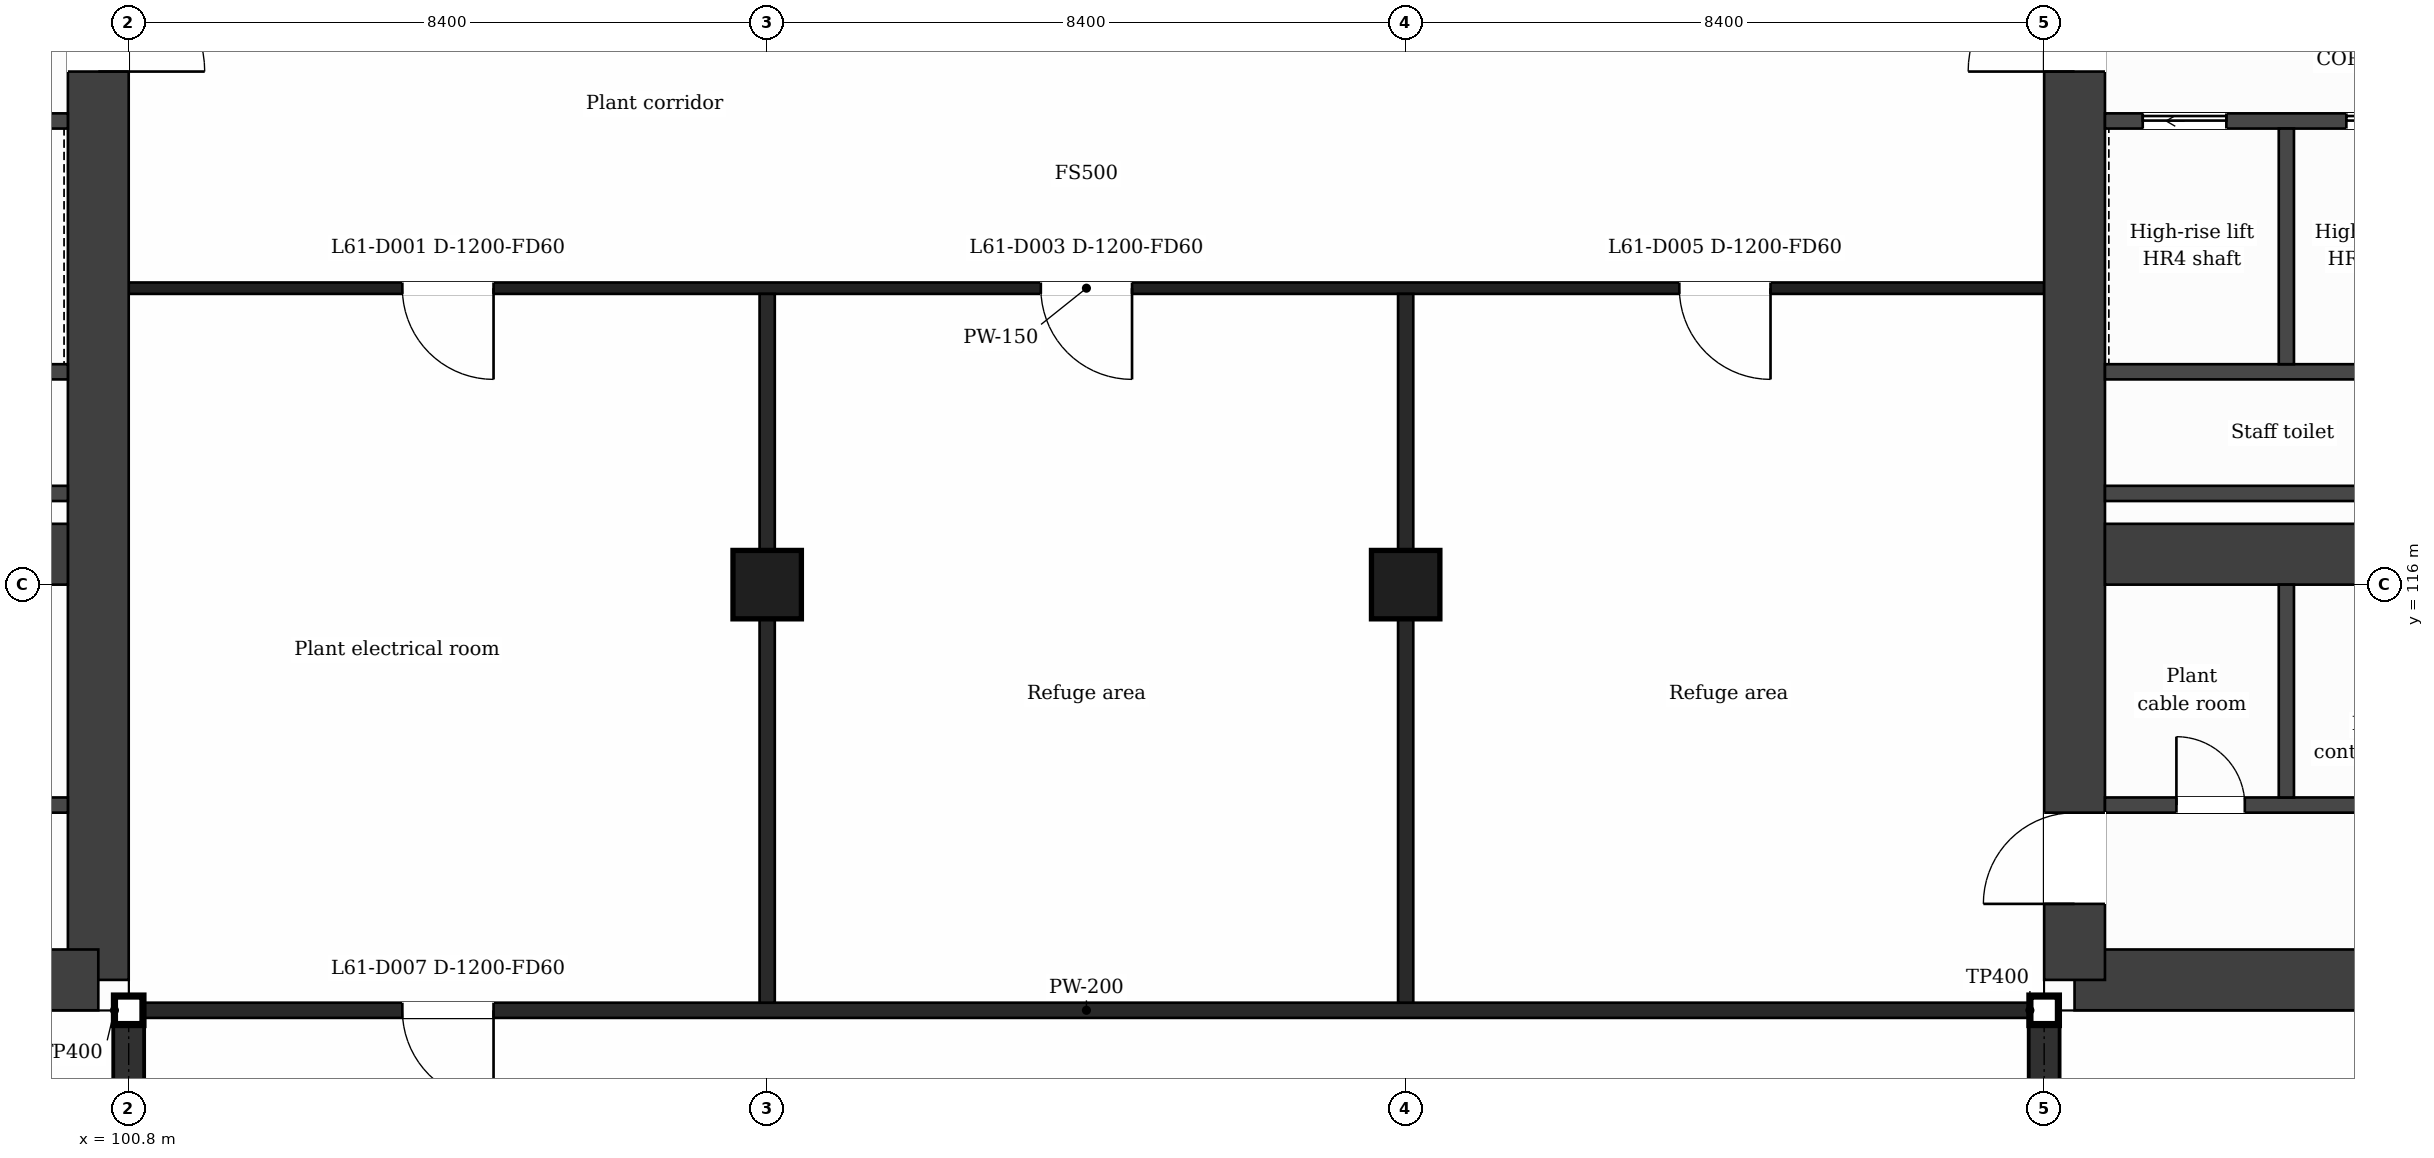
"""IFC4 building model, lengths in metres.
Left out: names, types, materials, properties, quantities, classifications, styles, units other than length and angle.
Written with IfcOpenShell. Run it as: python <this file> out.ifc"""

import sys

from ifc_helpers import new_model, si_unit, direction, frame, frame_2d, origin, origin_2d, place, context, subcontext, project, spatial, rectangle, extrude, element, fill, save


model = new_model("IFC4")
c1 = context("Model", 3, precision=1e-05, world=origin(), true_north=direction((0.0, 1.0)))
c2 = subcontext(c1, "Body", "Model", "MODEL_VIEW")
j1 = project(units=[si_unit("LENGTHUNIT", "METRE"), si_unit("PLANEANGLEUNIT", "RADIAN")], contexts=[c1])
p1 = place(None, origin())
s1 = spatial("IfcSite", under=j1, at=p1, CompositionType="ELEMENT")
p2 = place(p1, origin())
s2 = spatial("IfcBuilding", under=s1, at=p2, CompositionType="ELEMENT")
p3 = place(p2, frame((0.0, 0.0, 254.0)))
s3 = spatial("IfcBuildingStorey", under=s2, at=p3, CompositionType="ELEMENT", Elevation=254.0)
p4 = place(p3, frame((100.4, 132.0, 0.0), z_axis=(0.0, 0.0, 1.0), x_axis=(0.0, -1.0, 0.0)))
e1 = element("IfcWall", 1, at=p4, inside=s3, PredefinedType="SHEAR", context=c2, shape_type="SweptSolid", body=[
    extrude(rectangle(XDim=21.2, YDim=0.8, at=frame_2d((10.6, 0.0))), origin(), (0.0, 0.0, 1.0), 5.0),
])
p5 = place(p4, frame((2.4, 0.0, 0.0)))
e2 = element("IfcOpeningElement", 2, at=p5, cuts=e1, PredefinedType="OPENING", context=c2, shape_type="SweptSolid", body=[
    extrude(rectangle(XDim=1.2, YDim=2.1, at=frame_2d((0.6, 1.05))), frame((0.0, 0.41, 0.0), z_axis=(0.0, -1.0, 0.0), x_axis=(1.0, 0.0, 0.0)), (0.0, 0.0, 1.0), 0.82),
])
p6 = place(p4, frame((7.85, 0.0, 0.0)))
e3 = element("IfcOpeningElement", 3, at=p6, cuts=e1, PredefinedType="OPENING", context=c2, shape_type="SweptSolid", body=[
    extrude(rectangle(XDim=1.4, YDim=2.1, at=frame_2d((0.7, 1.05))), frame((0.0, 0.41, 0.0), z_axis=(0.0, -1.0, 0.0), x_axis=(1.0, 0.0, 0.0)), (0.0, 0.0, 1.0), 0.82),
])
p7 = place(p3, frame((100.4, 110.8, 0.0), z_axis=(0.0, 0.0, 1.0), x_axis=(-1.0, 0.0, 0.0)))
e4 = element("IfcWall", 4, at=p7, inside=s3, PredefinedType="SHEAR", context=c2, shape_type="SweptSolid", body=[
    extrude(rectangle(XDim=14.273, YDim=0.8, at=frame_2d((7.137, 0.0))), origin(), (0.0, 0.0, 1.0), 5.0),
])
p8 = place(p7, frame((5.908, 0.0, 0.0)))
e5 = element("IfcOpeningElement", 5, at=p8, cuts=e4, PredefinedType="OPENING", context=c2, shape_type="SweptSolid", body=[
    extrude(rectangle(XDim=1.4, YDim=2.1, at=frame_2d((0.7, 1.05))), frame((0.0, 0.41, 0.0), z_axis=(0.0, -1.0, 0.0), x_axis=(1.0, 0.0, 0.0)), (0.0, 0.0, 1.0), 0.82),
])
p9 = place(p3, frame((94.7, 116.4, 0.0), z_axis=(0.0, 0.0, 1.0), x_axis=(1.0, 0.0, 0.0)))
e6 = element("IfcWall", 6, at=p9, inside=s3, PredefinedType="SHEAR", context=c2, shape_type="SweptSolid", body=[
    extrude(rectangle(XDim=5.3, YDim=0.8, at=frame_2d((2.65, 0.0))), origin(), (0.0, 0.0, 1.0), 5.0),
])
p10 = place(p3, frame((140.673, 110.8, 0.0), z_axis=(0.0, 0.0, 1.0), x_axis=(-1.0, 0.0, 0.0)))
e7 = element("IfcWall", 7, at=p10, inside=s3, PredefinedType="SHEAR", context=c2, shape_type="SweptSolid", body=[
    extrude(rectangle(XDim=14.273, YDim=0.8, at=frame_2d((7.137, 0.0))), origin(), (0.0, 0.0, 1.0), 5.0),
])
p11 = place(p10, frame((6.965, 0.0, 0.0)))
e8 = element("IfcOpeningElement", 8, at=p11, cuts=e7, PredefinedType="OPENING", context=c2, shape_type="SweptSolid", body=[
    extrude(rectangle(XDim=1.4, YDim=2.1, at=frame_2d((0.7, 1.05))), frame((0.0, 0.41, 0.0), z_axis=(0.0, -1.0, 0.0), x_axis=(1.0, 0.0, 0.0)), (0.0, 0.0, 1.0), 0.82),
])
p12 = place(p3, frame((126.4, 110.8, 0.0), z_axis=(0.0, 0.0, 1.0), x_axis=(0.0, 1.0, 0.0)))
e9 = element("IfcWall", 9, at=p12, inside=s3, PredefinedType="SHEAR", context=c2, shape_type="SweptSolid", body=[
    extrude(rectangle(XDim=21.2, YDim=0.8, at=frame_2d((10.6, 0.0))), origin(), (0.0, 0.0, 1.0), 5.0),
])
p13 = place(p12, frame((1.0, 0.0, 0.0)))
e10 = element("IfcOpeningElement", 10, at=p13, cuts=e9, PredefinedType="OPENING", context=c2, shape_type="SweptSolid", body=[
    extrude(rectangle(XDim=1.2, YDim=2.1, at=frame_2d((0.6, 1.05))), frame((0.0, 0.41, 0.0), z_axis=(0.0, -1.0, 0.0), x_axis=(1.0, 0.0, 0.0)), (0.0, 0.0, 1.0), 0.82),
])
p14 = place(p12, frame((11.95, 0.0, 0.0)))
e11 = element("IfcOpeningElement", 11, at=p14, cuts=e9, PredefinedType="OPENING", context=c2, shape_type="SweptSolid", body=[
    extrude(rectangle(XDim=1.4, YDim=2.1, at=frame_2d((0.7, 1.05))), frame((0.0, 0.41, 0.0), z_axis=(0.0, -1.0, 0.0), x_axis=(1.0, 0.0, 0.0)), (0.0, 0.0, 1.0), 0.82),
])
p15 = place(p3, frame((126.8, 116.4, 0.0), z_axis=(0.0, 0.0, 1.0), x_axis=(1.0, 0.0, 0.0)))
e12 = element("IfcWall", 12, at=p15, inside=s3, PredefinedType="SHEAR", context=c2, shape_type="SweptSolid", body=[
    extrude(rectangle(XDim=5.3, YDim=0.8, at=frame_2d((2.65, 0.0))), origin(), (0.0, 0.0, 1.0), 5.0),
])
for number, where, z_axis, x_axis in (
    (13, (109.2, 116.0, 0.0), (0.0, 0.0, 1.0), (1.0, 0.0, 0.0)),
    (14, (117.6, 116.0, 0.0), (0.0, 0.0, 1.0), (1.0, 0.0, 0.0)),
):
    element("IfcColumn", number, at=place(p3, frame(where, z_axis=z_axis, x_axis=x_axis)), inside=s3, PredefinedType="COLUMN", context=c2, shape_type="SweptSolid", body=[
        extrude(rectangle(XDim=0.9, YDim=0.9, at=origin_2d()), origin(), (0.0, 0.0, 1.0), 5.0),
    ])
p16 = place(p3, frame((100.7, 110.4, 0.0), z_axis=(0.0, 0.0, 1.0), x_axis=(1.0, 0.0, 0.0)))
e15 = element("IfcWall", 15, at=p16, inside=s3, PredefinedType="PARTITIONING", context=c2, shape_type="SweptSolid", body=[
    extrude(rectangle(XDim=25.4, YDim=0.2, at=frame_2d((12.7, 0.0))), origin(), (0.0, 0.0, 1.0), 4.68),
])
p17 = place(p16, frame((3.7, 0.0, 0.0)))
e16 = element("IfcOpeningElement", 16, at=p17, cuts=e15, PredefinedType="OPENING", context=c2, shape_type="SweptSolid", body=[
    extrude(rectangle(XDim=1.2, YDim=2.1, at=frame_2d((0.6, 1.05))), frame((0.0, 0.11, 0.0), z_axis=(0.0, -1.0, 0.0), x_axis=(1.0, 0.0, 0.0)), (0.0, 0.0, 1.0), 0.22),
])
p18 = place(p3, frame((95.127, 113.1, 0.0), z_axis=(0.0, 0.0, 1.0), x_axis=(1.0, 0.0, 0.0)))
e17 = element("IfcWall", 17, at=p18, inside=s3, PredefinedType="PARTITIONING", context=c2, shape_type="SweptSolid", body=[
    extrude(rectangle(XDim=4.873, YDim=0.2, at=frame_2d((2.437, 0.0))), origin(), (0.0, 0.0, 1.0), 4.68),
])
p19 = place(p18, frame((3.151, 0.0, 0.0)))
e18 = element("IfcOpeningElement", 18, at=p19, cuts=e17, PredefinedType="OPENING", context=c2, shape_type="SweptSolid", body=[
    extrude(rectangle(XDim=0.9, YDim=2.1, at=frame_2d((0.45, 1.05))), frame((0.0, 0.11, 0.0), z_axis=(0.0, -1.0, 0.0), x_axis=(1.0, 0.0, 0.0)), (0.0, 0.0, 1.0), 0.22),
])
p20 = place(p3, frame((126.8, 113.1, 0.0), z_axis=(0.0, 0.0, 1.0), x_axis=(1.0, 0.0, 0.0)))
e19 = element("IfcWall", 19, at=p20, inside=s3, PredefinedType="PARTITIONING", context=c2, shape_type="SweptSolid", body=[
    extrude(rectangle(XDim=4.873, YDim=0.2, at=frame_2d((2.437, 0.0))), origin(), (0.0, 0.0, 1.0), 4.68),
])
p21 = place(p20, frame((0.94, 0.0, 0.0)))
e20 = element("IfcOpeningElement", 20, at=p21, cuts=e19, PredefinedType="OPENING", context=c2, shape_type="SweptSolid", body=[
    extrude(rectangle(XDim=0.9, YDim=2.1, at=frame_2d((0.45, 1.05))), frame((0.0, 0.11, 0.0), z_axis=(0.0, -1.0, 0.0), x_axis=(1.0, 0.0, 0.0)), (0.0, 0.0, 1.0), 0.22),
])
for number, where, z_axis, x_axis in (
    (21, (95.227, 117.2, 0.0), (0.0, 0.0, 1.0), (1.0, 0.0, 0.0)),
    (22, (126.8, 117.2, 0.0), (0.0, 0.0, 1.0), (1.0, 0.0, 0.0)),
    (23, (95.227, 118.8, 0.0), (0.0, 0.0, 1.0), (1.0, 0.0, 0.0)),
    (24, (126.8, 118.8, 0.0), (0.0, 0.0, 1.0), (1.0, 0.0, 0.0)),
):
    element("IfcWall", number, at=place(p3, frame(where, z_axis=z_axis, x_axis=x_axis)), inside=s3, PredefinedType="PARTITIONING", context=c2, shape_type="SweptSolid", body=[
        extrude(rectangle(XDim=4.773, YDim=0.2, at=frame_2d((2.386, 0.0))), origin(), (0.0, 0.0, 1.0), 4.68),
    ])
p22 = place(p3, frame((100.8, 119.9, 0.0), z_axis=(0.0, 0.0, 1.0), x_axis=(1.0, 0.0, 0.0)))
e25 = element("IfcWall", 25, at=p22, inside=s3, PredefinedType="PARTITIONING", context=c2, shape_type="SweptSolid", body=[
    extrude(rectangle(XDim=25.2, YDim=0.15, at=frame_2d((12.6, 0.0))), origin(), (0.0, 0.0, 1.0), 4.68),
])
p23 = place(p22, frame((3.6, 0.0, 0.0)))
e26 = element("IfcOpeningElement", 26, at=p23, cuts=e25, PredefinedType="OPENING", context=c2, shape_type="SweptSolid", body=[
    extrude(rectangle(XDim=1.2, YDim=2.1, at=frame_2d((0.6, 1.05))), frame((0.0, 0.085, 0.0), z_axis=(0.0, -1.0, 0.0), x_axis=(1.0, 0.0, 0.0)), (0.0, 0.0, 1.0), 0.17),
])
p24 = place(p22, frame((12.0, 0.0, 0.0)))
e27 = element("IfcOpeningElement", 27, at=p24, cuts=e25, PredefinedType="OPENING", context=c2, shape_type="SweptSolid", body=[
    extrude(rectangle(XDim=1.2, YDim=2.1, at=frame_2d((0.6, 1.05))), frame((0.0, 0.085, 0.0), z_axis=(0.0, -1.0, 0.0), x_axis=(1.0, 0.0, 0.0)), (0.0, 0.0, 1.0), 0.17),
])
p25 = place(p22, frame((20.4, 0.0, 0.0)))
e28 = element("IfcOpeningElement", 28, at=p25, cuts=e25, PredefinedType="OPENING", context=c2, shape_type="SweptSolid", body=[
    extrude(rectangle(XDim=1.2, YDim=2.1, at=frame_2d((0.6, 1.05))), frame((0.0, 0.085, 0.0), z_axis=(0.0, -1.0, 0.0), x_axis=(1.0, 0.0, 0.0)), (0.0, 0.0, 1.0), 0.17),
])
p26 = place(p3, frame((95.227, 122.1, 0.0), z_axis=(0.0, 0.0, 1.0), x_axis=(1.0, 0.0, 0.0)))
e29 = element("IfcWall", 29, at=p26, inside=s3, PredefinedType="PARTITIONING", context=c2, shape_type="SweptSolid", body=[
    extrude(rectangle(XDim=4.773, YDim=0.2, at=frame_2d((2.386, 0.0))), origin(), (0.0, 0.0, 1.0), 4.68),
])
p27 = place(p26, frame((0.585, 0.0, 0.0)))
e30 = element("IfcOpeningElement", 30, at=p27, cuts=e29, PredefinedType="OPENING", context=c2, shape_type="SweptSolid", body=[
    extrude(rectangle(XDim=1.1, YDim=2.1, at=frame_2d((0.55, 1.05))), frame((0.0, 0.11, 0.0), z_axis=(0.0, -1.0, 0.0), x_axis=(1.0, 0.0, 0.0)), (0.0, 0.0, 1.0), 0.22),
])
p28 = place(p26, frame((3.176, 0.0, 0.0)))
e31 = element("IfcOpeningElement", 31, at=p28, cuts=e29, PredefinedType="OPENING", context=c2, shape_type="SweptSolid", body=[
    extrude(rectangle(XDim=1.1, YDim=2.1, at=frame_2d((0.55, 1.05))), frame((0.0, 0.11, 0.0), z_axis=(0.0, -1.0, 0.0), x_axis=(1.0, 0.0, 0.0)), (0.0, 0.0, 1.0), 0.22),
])
p29 = place(p3, frame((126.8, 122.1, 0.0), z_axis=(0.0, 0.0, 1.0), x_axis=(1.0, 0.0, 0.0)))
e32 = element("IfcWall", 32, at=p29, inside=s3, PredefinedType="PARTITIONING", context=c2, shape_type="SweptSolid", body=[
    extrude(rectangle(XDim=4.773, YDim=0.2, at=frame_2d((2.386, 0.0))), origin(), (0.0, 0.0, 1.0), 4.68),
])
p30 = place(p29, frame((3.176, 0.0, 0.0)))
e33 = element("IfcOpeningElement", 33, at=p30, cuts=e32, PredefinedType="OPENING", context=c2, shape_type="SweptSolid", body=[
    extrude(rectangle(XDim=1.1, YDim=2.1, at=frame_2d((0.55, 1.05))), frame((0.0, 0.11, 0.0), z_axis=(0.0, -1.0, 0.0), x_axis=(1.0, 0.0, 0.0)), (0.0, 0.0, 1.0), 0.22),
])
p31 = place(p29, frame((0.497, 0.0, 0.0)))
e34 = element("IfcOpeningElement", 34, at=p31, cuts=e32, PredefinedType="OPENING", context=c2, shape_type="SweptSolid", body=[
    extrude(rectangle(XDim=1.1, YDim=2.1, at=frame_2d((0.55, 1.05))), frame((0.0, 0.11, 0.0), z_axis=(0.0, -1.0, 0.0), x_axis=(1.0, 0.0, 0.0)), (0.0, 0.0, 1.0), 0.22),
])
p32 = place(p3, frame((100.8, 99.79, 0.0), z_axis=(0.0, 0.0, 1.0), x_axis=(0.0, 1.0, 0.0)))
e35 = element("IfcWall", 35, at=p32, inside=s3, PredefinedType="PARTITIONING", context=c2, shape_type="SweptSolid", body=[
    extrude(rectangle(XDim=10.51, YDim=0.2, at=frame_2d((5.255, 0.0))), origin(), (0.0, 0.0, 1.0), 4.68),
])
for number, where, z_axis, x_axis in (
    (36, (109.2, 110.5, 0.0), (0.0, 0.0, 1.0), (0.0, 1.0, 0.0)),
    (37, (117.6, 110.5, 0.0), (0.0, 0.0, 1.0), (0.0, 1.0, 0.0)),
):
    element("IfcWall", number, at=place(p3, frame(where, z_axis=z_axis, x_axis=x_axis)), inside=s3, PredefinedType="PARTITIONING", context=c2, shape_type="SweptSolid", body=[
        extrude(rectangle(XDim=9.325, YDim=0.2, at=frame_2d((4.663, 0.0))), origin(), (0.0, 0.0, 1.0), 4.68),
    ])
p33 = place(p3, frame((126.0, 99.79, 0.0), z_axis=(0.0, 0.0, 1.0), x_axis=(0.0, 1.0, 0.0)))
e38 = element("IfcWall", 38, at=p33, inside=s3, PredefinedType="PARTITIONING", context=c2, shape_type="SweptSolid", body=[
    extrude(rectangle(XDim=10.51, YDim=0.2, at=frame_2d((5.255, 0.0))), origin(), (0.0, 0.0, 1.0), 4.68),
])
p34 = place(p3, frame((129.187, 113.2, 0.0), z_axis=(0.0, 0.0, 1.0), x_axis=(0.0, 1.0, 0.0)))
e39 = element("IfcWall", 39, at=p34, inside=s3, PredefinedType="PARTITIONING", context=c2, shape_type="SweptSolid", body=[
    extrude(rectangle(XDim=2.8, YDim=0.2, at=frame_2d((1.4, 0.0))), origin(), (0.0, 0.0, 1.0), 4.68),
])
p35 = place(p3, frame((129.187, 118.9, 0.0), z_axis=(0.0, 0.0, 1.0), x_axis=(0.0, 1.0, 0.0)))
e40 = element("IfcWall", 40, at=p35, inside=s3, PredefinedType="PARTITIONING", context=c2, shape_type="SweptSolid", body=[
    extrude(rectangle(XDim=3.1, YDim=0.2, at=frame_2d((1.55, 0.0))), origin(), (0.0, 0.0, 1.0), 4.68),
])
p36 = place(p23, origin())
e41 = element("IfcDoor", 41, at=p36, inside=s3, OperationType="SINGLE_SWING_RIGHT", PredefinedType="DOOR", context=c2, shape_type="SweptSolid", body=[
    extrude(rectangle(XDim=1.2, YDim=2.1, at=frame_2d((0.6, 1.05))), frame((0.0, 0.025, 0.0), z_axis=(0.0, -1.0, 0.0), x_axis=(1.0, 0.0, 0.0)), (0.0, 0.0, 1.0), 0.05),
])
fill(e26, e41)
p37 = place(p24, origin())
e42 = element("IfcDoor", 42, at=p37, inside=s3, OperationType="SINGLE_SWING_RIGHT", PredefinedType="DOOR", context=c2, shape_type="SweptSolid", body=[
    extrude(rectangle(XDim=1.2, YDim=2.1, at=frame_2d((0.6, 1.05))), frame((0.0, 0.025, 0.0), z_axis=(0.0, -1.0, 0.0), x_axis=(1.0, 0.0, 0.0)), (0.0, 0.0, 1.0), 0.05),
])
fill(e27, e42)
p38 = place(p25, origin())
e43 = element("IfcDoor", 43, at=p38, inside=s3, OperationType="SINGLE_SWING_RIGHT", PredefinedType="DOOR", context=c2, shape_type="SweptSolid", body=[
    extrude(rectangle(XDim=1.2, YDim=2.1, at=frame_2d((0.6, 1.05))), frame((0.0, 0.025, 0.0), z_axis=(0.0, -1.0, 0.0), x_axis=(1.0, 0.0, 0.0)), (0.0, 0.0, 1.0), 0.05),
])
fill(e28, e43)
p39 = place(p17, origin())
e44 = element("IfcDoor", 44, at=p39, inside=s3, OperationType="SINGLE_SWING_RIGHT", PredefinedType="DOOR", context=c2, shape_type="SweptSolid", body=[
    extrude(rectangle(XDim=1.2, YDim=2.1, at=frame_2d((0.6, 1.05))), frame((0.0, 0.025, 0.0), z_axis=(0.0, -1.0, 0.0), x_axis=(1.0, 0.0, 0.0)), (0.0, 0.0, 1.0), 0.05),
])
fill(e16, e44)
p40 = place(p30, origin())
e45 = element("IfcDoor", 45, at=p40, inside=s3, OperationType="SLIDING_TO_LEFT", PredefinedType="DOOR", context=c2, shape_type="SweptSolid", body=[
    extrude(rectangle(XDim=1.1, YDim=2.1, at=frame_2d((0.55, 1.05))), frame((0.0, 0.025, 0.0), z_axis=(0.0, -1.0, 0.0), x_axis=(1.0, 0.0, 0.0)), (0.0, 0.0, 1.0), 0.05),
])
fill(e33, e45)
p41 = place(p31, origin())
e46 = element("IfcDoor", 46, at=p41, inside=s3, OperationType="SLIDING_TO_LEFT", PredefinedType="DOOR", context=c2, shape_type="SweptSolid", body=[
    extrude(rectangle(XDim=1.1, YDim=2.1, at=frame_2d((0.55, 1.05))), frame((0.0, 0.025, 0.0), z_axis=(0.0, -1.0, 0.0), x_axis=(1.0, 0.0, 0.0)), (0.0, 0.0, 1.0), 0.05),
])
fill(e34, e46)
p42 = place(p21, origin())
e47 = element("IfcDoor", 47, at=p42, inside=s3, OperationType="SINGLE_SWING_LEFT", PredefinedType="DOOR", context=c2, shape_type="SweptSolid", body=[
    extrude(rectangle(XDim=0.9, YDim=2.1, at=frame_2d((0.45, 1.05))), frame((0.0, 0.025, 0.0), z_axis=(0.0, -1.0, 0.0), x_axis=(1.0, 0.0, 0.0)), (0.0, 0.0, 1.0), 0.05),
])
fill(e20, e47)
p43 = place(p13, origin())
e48 = element("IfcDoor", 48, at=p43, inside=s3, OperationType="SINGLE_SWING_LEFT", PredefinedType="DOOR", context=c2, shape_type="SweptSolid", body=[
    extrude(rectangle(XDim=1.2, YDim=2.1, at=frame_2d((0.6, 1.05))), frame((0.0, 0.025, 0.0), z_axis=(0.0, -1.0, 0.0), x_axis=(1.0, 0.0, 0.0)), (0.0, 0.0, 1.0), 0.05),
])
fill(e10, e48)
p44 = place(p6, origin())
e49 = element("IfcDoor", 49, at=p44, inside=s3, OperationType="SINGLE_SWING_RIGHT", PredefinedType="DOOR", context=c2, shape_type="SweptSolid", body=[
    extrude(rectangle(XDim=1.4, YDim=2.1, at=frame_2d((0.7, 1.05))), frame((0.0, 0.025, 0.0), z_axis=(0.0, -1.0, 0.0), x_axis=(1.0, 0.0, 0.0)), (0.0, 0.0, 1.0), 0.05),
])
fill(e3, e49)
p45 = place(p14, origin())
e50 = element("IfcDoor", 50, at=p45, inside=s3, OperationType="SINGLE_SWING_LEFT", PredefinedType="DOOR", context=c2, shape_type="SweptSolid", body=[
    extrude(rectangle(XDim=1.4, YDim=2.1, at=frame_2d((0.7, 1.05))), frame((0.0, 0.025, 0.0), z_axis=(0.0, -1.0, 0.0), x_axis=(1.0, 0.0, 0.0)), (0.0, 0.0, 1.0), 0.05),
])
fill(e11, e50)
save(model, sys.argv[1])
